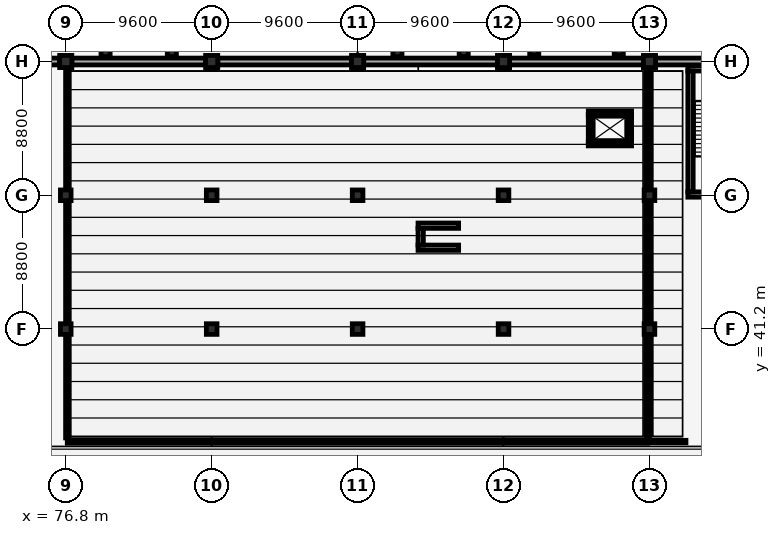
"""IFC4 building model, lengths in metres.
Left out: names, types, materials, properties, quantities, classifications, styles, units other than length and angle.
Written with IfcOpenShell. Run it as: python <this file> out.ifc"""

import sys

from ifc_helpers import new_model, si_unit, direction, frame, frame_2d, origin, origin_2d, place, context, subcontext, project, spatial, rectangle, extrude, element, fill, save


model = new_model("IFC4")
c1 = context("Model", 3, precision=1e-05, world=origin(), true_north=direction((0.0, 1.0)))
c2 = subcontext(c1, "Body", "Model", "MODEL_VIEW")
j1 = project(units=[si_unit("LENGTHUNIT", "METRE"), si_unit("PLANEANGLEUNIT", "RADIAN")], contexts=[c1])
p1 = place(None, origin())
s1 = spatial("IfcSite", under=j1, at=p1, CompositionType="ELEMENT")
p2 = place(p1, origin())
s2 = spatial("IfcBuilding", under=s1, at=p2, CompositionType="ELEMENT")
p3 = place(p2, frame((0.0, 0.0, -4.2)))
s3 = spatial("IfcBuildingStorey", under=s2, at=p3, CompositionType="ELEMENT", Elevation=-4.2)
for number, where, z_axis, x_axis in (
    (1, (76.8, 41.2, 0.0), (0.0, 0.0, 1.0), (1.0, 0.0, 0.0)),
    (2, (76.8, 50.0, 0.0), (0.0, 0.0, 1.0), (1.0, 0.0, 0.0)),
):
    element("IfcColumn", number, at=place(p3, frame(where, z_axis=z_axis, x_axis=x_axis)), inside=s3, PredefinedType="COLUMN", context=c2, shape_type="SweptSolid", body=[
        extrude(rectangle(XDim=0.7, YDim=0.7, at=origin_2d()), origin(), (0.0, 0.0, 1.0), 4.2),
    ])
p4 = place(p3, frame((76.8, 58.8, 0.0), z_axis=(0.0, 0.0, 1.0), x_axis=(1.0, 0.0, 0.0)))
e3 = element("IfcColumn", 3, at=p4, inside=s3, PredefinedType="COLUMN", context=c2, shape_type="SweptSolid", body=[
    extrude(rectangle(XDim=0.8, YDim=0.8, at=origin_2d()), origin(), (0.0, 0.0, 1.0), 4.2),
])
for number, where, z_axis, x_axis in (
    (4, (86.4, 41.2, 0.0), (0.0, 0.0, 1.0), (1.0, 0.0, 0.0)),
    (5, (86.4, 50.0, 0.0), (0.0, 0.0, 1.0), (1.0, 0.0, 0.0)),
):
    element("IfcColumn", number, at=place(p3, frame(where, z_axis=z_axis, x_axis=x_axis)), inside=s3, PredefinedType="COLUMN", context=c2, shape_type="SweptSolid", body=[
        extrude(rectangle(XDim=0.7, YDim=0.7, at=origin_2d()), origin(), (0.0, 0.0, 1.0), 4.2),
    ])
p5 = place(p3, frame((86.4, 58.8, 0.0), z_axis=(0.0, 0.0, 1.0), x_axis=(1.0, 0.0, 0.0)))
e6 = element("IfcColumn", 6, at=p5, inside=s3, PredefinedType="COLUMN", context=c2, shape_type="SweptSolid", body=[
    extrude(rectangle(XDim=0.8, YDim=0.8, at=origin_2d()), origin(), (0.0, 0.0, 1.0), 4.2),
])
for number, where, z_axis, x_axis in (
    (7, (96.0, 41.2, 0.0), (0.0, 0.0, 1.0), (1.0, 0.0, 0.0)),
    (8, (96.0, 50.0, 0.0), (0.0, 0.0, 1.0), (1.0, 0.0, 0.0)),
):
    element("IfcColumn", number, at=place(p3, frame(where, z_axis=z_axis, x_axis=x_axis)), inside=s3, PredefinedType="COLUMN", context=c2, shape_type="SweptSolid", body=[
        extrude(rectangle(XDim=0.7, YDim=0.7, at=origin_2d()), origin(), (0.0, 0.0, 1.0), 4.2),
    ])
p6 = place(p3, frame((96.0, 58.8, 0.0), z_axis=(0.0, 0.0, 1.0), x_axis=(1.0, 0.0, 0.0)))
e9 = element("IfcColumn", 9, at=p6, inside=s3, PredefinedType="COLUMN", context=c2, shape_type="SweptSolid", body=[
    extrude(rectangle(XDim=0.8, YDim=0.8, at=origin_2d()), origin(), (0.0, 0.0, 1.0), 4.2),
])
for number, where, z_axis, x_axis in (
    (10, (105.6, 41.2, 0.0), (0.0, 0.0, 1.0), (1.0, 0.0, 0.0)),
    (11, (105.6, 50.0, 0.0), (0.0, 0.0, 1.0), (1.0, 0.0, 0.0)),
):
    element("IfcColumn", number, at=place(p3, frame(where, z_axis=z_axis, x_axis=x_axis)), inside=s3, PredefinedType="COLUMN", context=c2, shape_type="SweptSolid", body=[
        extrude(rectangle(XDim=0.7, YDim=0.7, at=origin_2d()), origin(), (0.0, 0.0, 1.0), 4.2),
    ])
p7 = place(p3, frame((105.6, 58.8, 0.0), z_axis=(0.0, 0.0, 1.0), x_axis=(1.0, 0.0, 0.0)))
e12 = element("IfcColumn", 12, at=p7, inside=s3, PredefinedType="COLUMN", context=c2, shape_type="SweptSolid", body=[
    extrude(rectangle(XDim=0.8, YDim=0.8, at=origin_2d()), origin(), (0.0, 0.0, 1.0), 4.2),
])
for number, where, z_axis, x_axis in (
    (13, (115.2, 41.2, 0.0), (0.0, 0.0, 1.0), (1.0, 0.0, 0.0)),
    (14, (115.2, 50.0, 0.0), (0.0, 0.0, 1.0), (1.0, 0.0, 0.0)),
):
    element("IfcColumn", number, at=place(p3, frame(where, z_axis=z_axis, x_axis=x_axis)), inside=s3, PredefinedType="COLUMN", context=c2, shape_type="SweptSolid", body=[
        extrude(rectangle(XDim=0.7, YDim=0.7, at=origin_2d()), origin(), (0.0, 0.0, 1.0), 4.2),
    ])
p8 = place(p3, frame((115.2, 58.8, 0.0), z_axis=(0.0, 0.0, 1.0), x_axis=(1.0, 0.0, 0.0)))
e15 = element("IfcColumn", 15, at=p8, inside=s3, PredefinedType="COLUMN", context=c2, shape_type="SweptSolid", body=[
    extrude(rectangle(XDim=0.8, YDim=0.8, at=origin_2d()), origin(), (0.0, 0.0, 1.0), 4.2),
])
p9 = place(p3, frame((124.4, 58.8, 0.0), z_axis=(0.0, 0.0, 1.0), x_axis=(-1.0, 0.0, 0.0)))
e16 = element("IfcWall", 16, at=p9, inside=s3, PredefinedType="SOLIDWALL", context=c2, shape_type="SweptSolid", body=[
    extrude(rectangle(XDim=8.8, YDim=0.45, at=frame_2d((4.4, 0.0))), origin(), (0.0, 0.0, 1.0), 3.84),
])
for number, where, z_axis, x_axis in (
    (17, (114.8, 58.8, 0.0), (0.0, 0.0, 1.0), (-1.0, 0.0, 0.0)),
    (18, (105.2, 58.8, 0.0), (0.0, 0.0, 1.0), (-1.0, 0.0, 0.0)),
    (19, (95.6, 58.8, 0.0), (0.0, 0.0, 1.0), (-1.0, 0.0, 0.0)),
    (20, (86.0, 58.8, 0.0), (0.0, 0.0, 1.0), (-1.0, 0.0, 0.0)),
):
    element("IfcWall", number, at=place(p3, frame(where, z_axis=z_axis, x_axis=x_axis)), inside=s3, PredefinedType="SOLIDWALL", context=c2, shape_type="SweptSolid", body=[
        extrude(rectangle(XDim=8.8, YDim=0.45, at=frame_2d((4.4, 0.0))), origin(), (0.0, 0.0, 1.0), 3.84),
    ])
p10 = place(p3, frame((76.4, 58.8, 0.0), z_axis=(0.0, 0.0, 1.0), x_axis=(-1.0, 0.0, 0.0)))
e21 = element("IfcWall", 21, at=p10, inside=s3, PredefinedType="SOLIDWALL", context=c2, shape_type="SweptSolid", body=[
    extrude(rectangle(XDim=8.8, YDim=0.45, at=frame_2d((4.4, 0.0))), origin(), (0.0, 0.0, 1.0), 3.84),
])
for number, where, z_axis, x_axis in (
    (22, (79.42, 59.42, 0.0), (0.0, 0.0, 1.0), (1.0, 0.0, 0.0)),
    (23, (83.78, 59.42, 0.0), (0.0, 0.0, 1.0), (1.0, 0.0, 0.0)),
    (24, (98.62, 59.42, 0.0), (0.0, 0.0, 1.0), (1.0, 0.0, 0.0)),
    (25, (102.98, 59.42, 0.0), (0.0, 0.0, 1.0), (1.0, 0.0, 0.0)),
    (26, (107.62, 59.52, 0.0), (0.0, 0.0, 1.0), (1.0, 0.0, 0.0)),
    (27, (113.18, 59.52, 0.0), (0.0, 0.0, 1.0), (1.0, 0.0, 0.0)),
):
    element("IfcColumn", number, at=place(p3, frame(where, z_axis=z_axis, x_axis=x_axis)), inside=s3, PredefinedType="COLUMN", context=c2, shape_type="SweptSolid", body=[
        extrude(rectangle(XDim=0.6, YDim=0.6, at=origin_2d()), origin(), (0.0, 0.0, 1.0), 4.2),
    ])
for number, where, z_axis, x_axis in (
    (28, (123.375, 50.05, 0.0), (0.0, 0.0, 1.0), (-1.0, 0.0, 0.0)),
    (29, (117.725, 58.35, 0.0), (0.0, 0.0, 1.0), (1.0, 0.0, 0.0)),
):
    element("IfcWall", number, at=place(p3, frame(where, z_axis=z_axis, x_axis=x_axis)), inside=s3, PredefinedType="SHEAR", context=c2, shape_type="SweptSolid", body=[
        extrude(rectangle(XDim=5.65, YDim=0.35, at=frame_2d((2.825, 0.0))), origin(), (0.0, 0.0, 1.0), 3.95),
    ])
p11 = place(p3, frame((117.9, 50.225, 0.0), z_axis=(0.0, 0.0, 1.0), x_axis=(0.0, 1.0, 0.0)))
e30 = element("IfcWall", 30, at=p11, inside=s3, PredefinedType="SHEAR", context=c2, shape_type="SweptSolid", body=[
    extrude(rectangle(XDim=7.95, YDim=0.35, at=frame_2d((3.975, 0.0))), origin(), (0.0, 0.0, 1.0), 3.95),
])
p12 = place(p11, frame((0.22, 0.0, 0.0)))
e31 = element("IfcOpeningElement", 31, at=p12, cuts=e30, PredefinedType="OPENING", context=c2, shape_type="SweptSolid", body=[
    extrude(rectangle(XDim=2.05, YDim=2.15, at=frame_2d((1.025, 1.075))), frame((0.0, 0.185, 0.0), z_axis=(0.0, -1.0, 0.0), x_axis=(1.0, 0.0, 0.0)), (0.0, 0.0, 1.0), 0.37),
])
for number, where, z_axis, x_axis in (
    (32, (99.975, 46.55, 0.0), (0.0, 0.0, 1.0), (1.0, 0.0, 0.0)),
    (33, (99.975, 48.0, 0.0), (0.0, 0.0, 1.0), (1.0, 0.0, 0.0)),
):
    element("IfcWall", number, at=place(p3, frame(where, z_axis=z_axis, x_axis=x_axis)), inside=s3, PredefinedType="SHEAR", context=c2, shape_type="SweptSolid", body=[
        extrude(rectangle(XDim=2.67, YDim=0.35, at=frame_2d((1.335, 0.0))), origin(), (0.0, 0.0, 1.0), 3.92),
    ])
p13 = place(p3, frame((100.15, 46.725, 0.0), z_axis=(0.0, 0.0, 1.0), x_axis=(0.0, 1.0, 0.0)))
e34 = element("IfcWall", 34, at=p13, inside=s3, PredefinedType="SHEAR", context=c2, shape_type="SweptSolid", body=[
    extrude(rectangle(XDim=1.1, YDim=0.35, at=frame_2d((0.55, 0.0))), origin(), (0.0, 0.0, 1.0), 3.92),
])
p14 = place(p3, frame((114.025, 53.375, -1.5), z_axis=(0.0, 0.0, 1.0), x_axis=(-1.0, 0.0, 0.0)))
e35 = element("IfcWall", 35, at=p14, inside=s3, PredefinedType="SOLIDWALL", context=c2, shape_type="SweptSolid", body=[
    extrude(rectangle(XDim=2.85, YDim=0.25, at=frame_2d((1.425, 0.0))), origin(), (0.0, 0.0, 1.0), 5.45),
])
p15 = place(p14, frame((0.875, 0.0, 1.5)))
e36 = element("IfcOpeningElement", 36, at=p15, cuts=e35, PredefinedType="OPENING", context=c2, shape_type="SweptSolid", body=[
    extrude(rectangle(XDim=1.1, YDim=2.15, at=frame_2d((0.55, 1.075))), frame((0.0, 0.135, 0.0), z_axis=(0.0, -1.0, 0.0), x_axis=(1.0, 0.0, 0.0)), (0.0, 0.0, 1.0), 0.27),
])
p16 = place(p3, frame((111.175, 55.425, -1.5), z_axis=(0.0, 0.0, 1.0), x_axis=(1.0, 0.0, 0.0)))
e37 = element("IfcWall", 37, at=p16, inside=s3, PredefinedType="SOLIDWALL", context=c2, shape_type="SweptSolid", body=[
    extrude(rectangle(XDim=2.85, YDim=0.25, at=frame_2d((1.425, 0.0))), origin(), (0.0, 0.0, 1.0), 5.45),
])
for number, where, z_axis, x_axis in (
    (38, (111.3, 53.5, -1.5), (0.0, 0.0, 1.0), (0.0, 1.0, 0.0)),
    (39, (113.9, 55.3, -1.5), (0.0, 0.0, 1.0), (0.0, -1.0, 0.0)),
):
    element("IfcWall", number, at=place(p3, frame(where, z_axis=z_axis, x_axis=x_axis)), inside=s3, PredefinedType="SOLIDWALL", context=c2, shape_type="SweptSolid", body=[
        extrude(rectangle(XDim=1.8, YDim=0.25, at=frame_2d((0.9, 0.0))), origin(), (0.0, 0.0, 1.0), 5.45),
    ])
p17 = place(p3, frame((115.15, 33.8, 0.0), z_axis=(0.0, 0.0, 1.0), x_axis=(1.0, 0.0, 0.0)))
e40 = element("IfcWall", 40, at=p17, inside=s3, PredefinedType="PARTITIONING", context=c2, shape_type="SweptSolid", body=[
    extrude(rectangle(XDim=2.45, YDim=0.16, at=frame_2d((1.225, 0.0))), origin(), (0.0, 0.0, 1.0), 3.84),
])
p18 = place(p17, frame((0.325, 0.0, 0.0)))
e41 = element("IfcOpeningElement", 41, at=p18, cuts=e40, PredefinedType="OPENING", context=c2, shape_type="SweptSolid", body=[
    extrude(rectangle(XDim=1.8, YDim=2.15, at=frame_2d((0.9, 1.075))), frame((0.0, 0.09, 0.0), z_axis=(0.0, -1.0, 0.0), x_axis=(1.0, 0.0, 0.0)), (0.0, 0.0, 1.0), 0.18),
])
p19 = place(p3, frame((76.9, 33.8, 0.0), z_axis=(0.0, 0.0, 1.0), x_axis=(1.0, 0.0, 0.0)))
e42 = element("IfcWall", 42, at=p19, inside=s3, PredefinedType="PARTITIONING", context=c2, shape_type="SweptSolid", body=[
    extrude(rectangle(XDim=38.17, YDim=0.22, at=frame_2d((19.085, 0.0))), origin(), (0.0, 0.0, 1.0), 3.84),
])
p20 = place(p19, frame((14.74, 0.0, 0.0)))
e43 = element("IfcOpeningElement", 43, at=p20, cuts=e42, PredefinedType="OPENING", context=c2, shape_type="SweptSolid", body=[
    extrude(rectangle(XDim=1.5, YDim=2.2, at=frame_2d((0.75, 1.1))), frame((0.0, 0.12, 0.0), z_axis=(0.0, -1.0, 0.0), x_axis=(1.0, 0.0, 0.0)), (0.0, 0.0, 1.0), 0.24),
])
p21 = place(p3, frame((115.1, 33.9, 0.0), z_axis=(0.0, 0.0, 1.0), x_axis=(0.0, 1.0, 0.0)))
e44 = element("IfcWall", 44, at=p21, inside=s3, PredefinedType="PARTITIONING", context=c2, shape_type="SweptSolid", body=[
    extrude(rectangle(XDim=24.85, YDim=0.22, at=frame_2d((12.425, 0.0))), origin(), (0.0, 0.0, 1.0), 3.199),
])
p22 = place(p21, frame((11.675, 0.0, 0.0)))
e45 = element("IfcOpeningElement", 45, at=p22, cuts=e44, PredefinedType="OPENING", context=c2, shape_type="SweptSolid", body=[
    extrude(rectangle(XDim=1.5, YDim=2.2, at=frame_2d((0.75, 1.1))), frame((0.0, 0.12, 0.0), z_axis=(0.0, -1.0, 0.0), x_axis=(1.0, 0.0, 0.0)), (0.0, 0.0, 1.0), 0.24),
])
for number, where, z_axis, x_axis in (
    (46, (86.14, 58.4, 0.0), (0.0, 0.0, 1.0), (1.0, 0.0, 0.0)),
    (47, (95.74, 58.4, 0.0), (0.0, 0.0, 1.0), (1.0, 0.0, 0.0)),
    (48, (105.34, 58.4, 0.0), (0.0, 0.0, 1.0), (1.0, 0.0, 0.0)),
):
    element("IfcWall", number, at=place(p3, frame(where, z_axis=z_axis, x_axis=x_axis)), inside=s3, PredefinedType="PARTITIONING", context=c2, shape_type="SweptSolid", body=[
        extrude(rectangle(XDim=0.52, YDim=0.22, at=frame_2d((0.26, 0.0))), origin(), (0.0, 0.0, 1.0), 3.84),
    ])
p23 = place(p3, frame((76.9, 34.04, 0.0), z_axis=(0.0, 0.0, 1.0), x_axis=(0.0, 1.0, 0.0)))
e49 = element("IfcWall", 49, at=p23, inside=s3, PredefinedType="PARTITIONING", context=c2, shape_type="SweptSolid", body=[
    extrude(rectangle(XDim=24.71, YDim=0.22, at=frame_2d((12.355, 0.0))), origin(), (0.0, 0.0, 1.0), 3.199),
])
p24 = place(p12, origin())
e50 = element("IfcDoor", 50, at=p24, inside=s3, OperationType="DOUBLE_DOOR_SINGLE_SWING", PredefinedType="DOOR", context=c2, shape_type="SweptSolid", body=[
    extrude(rectangle(XDim=2.05, YDim=2.15, at=frame_2d((1.025, 1.075))), frame((0.0, 0.025, 0.0), z_axis=(0.0, -1.0, 0.0), x_axis=(1.0, 0.0, 0.0)), (0.0, 0.0, 1.0), 0.05),
])
fill(e31, e50)
p25 = place(p15, origin())
e51 = element("IfcDoor", 51, at=p25, inside=s3, OperationType="DOUBLE_DOOR_SLIDING", PredefinedType="DOOR", context=c2, shape_type="SweptSolid", body=[
    extrude(rectangle(XDim=1.1, YDim=2.15, at=frame_2d((0.55, 1.075))), frame((0.0, 0.025, 0.0), z_axis=(0.0, -1.0, 0.0), x_axis=(1.0, 0.0, 0.0)), (0.0, 0.0, 1.0), 0.05),
])
fill(e36, e51)
p26 = place(p18, origin())
e52 = element("IfcDoor", 52, at=p26, inside=s3, OperationType="DOUBLE_DOOR_SINGLE_SWING", PredefinedType="DOOR", context=c2, shape_type="SweptSolid", body=[
    extrude(rectangle(XDim=1.8, YDim=2.15, at=frame_2d((0.9, 1.075))), frame((0.0, 0.025, 0.0), z_axis=(0.0, -1.0, 0.0), x_axis=(1.0, 0.0, 0.0)), (0.0, 0.0, 1.0), 0.05),
])
fill(e41, e52)
p27 = place(p20, origin())
e53 = element("IfcDoor", 53, at=p27, inside=s3, OperationType="SLIDING_TO_RIGHT", PredefinedType="DOOR", context=c2, shape_type="SweptSolid", body=[
    extrude(rectangle(XDim=1.5, YDim=2.2, at=frame_2d((0.75, 1.1))), frame((0.0, 0.025, 0.0), z_axis=(0.0, -1.0, 0.0), x_axis=(1.0, 0.0, 0.0)), (0.0, 0.0, 1.0), 0.05),
])
fill(e43, e53)
p28 = place(p22, origin())
e54 = element("IfcDoor", 54, at=p28, inside=s3, OperationType="SLIDING_TO_RIGHT", PredefinedType="DOOR", context=c2, shape_type="SweptSolid", body=[
    extrude(rectangle(XDim=1.5, YDim=2.2, at=frame_2d((0.75, 1.1))), frame((0.0, 0.025, 0.0), z_axis=(0.0, -1.0, 0.0), x_axis=(1.0, 0.0, 0.0)), (0.0, 0.0, 1.0), 0.05),
])
fill(e45, e54)
save(model, sys.argv[1])
